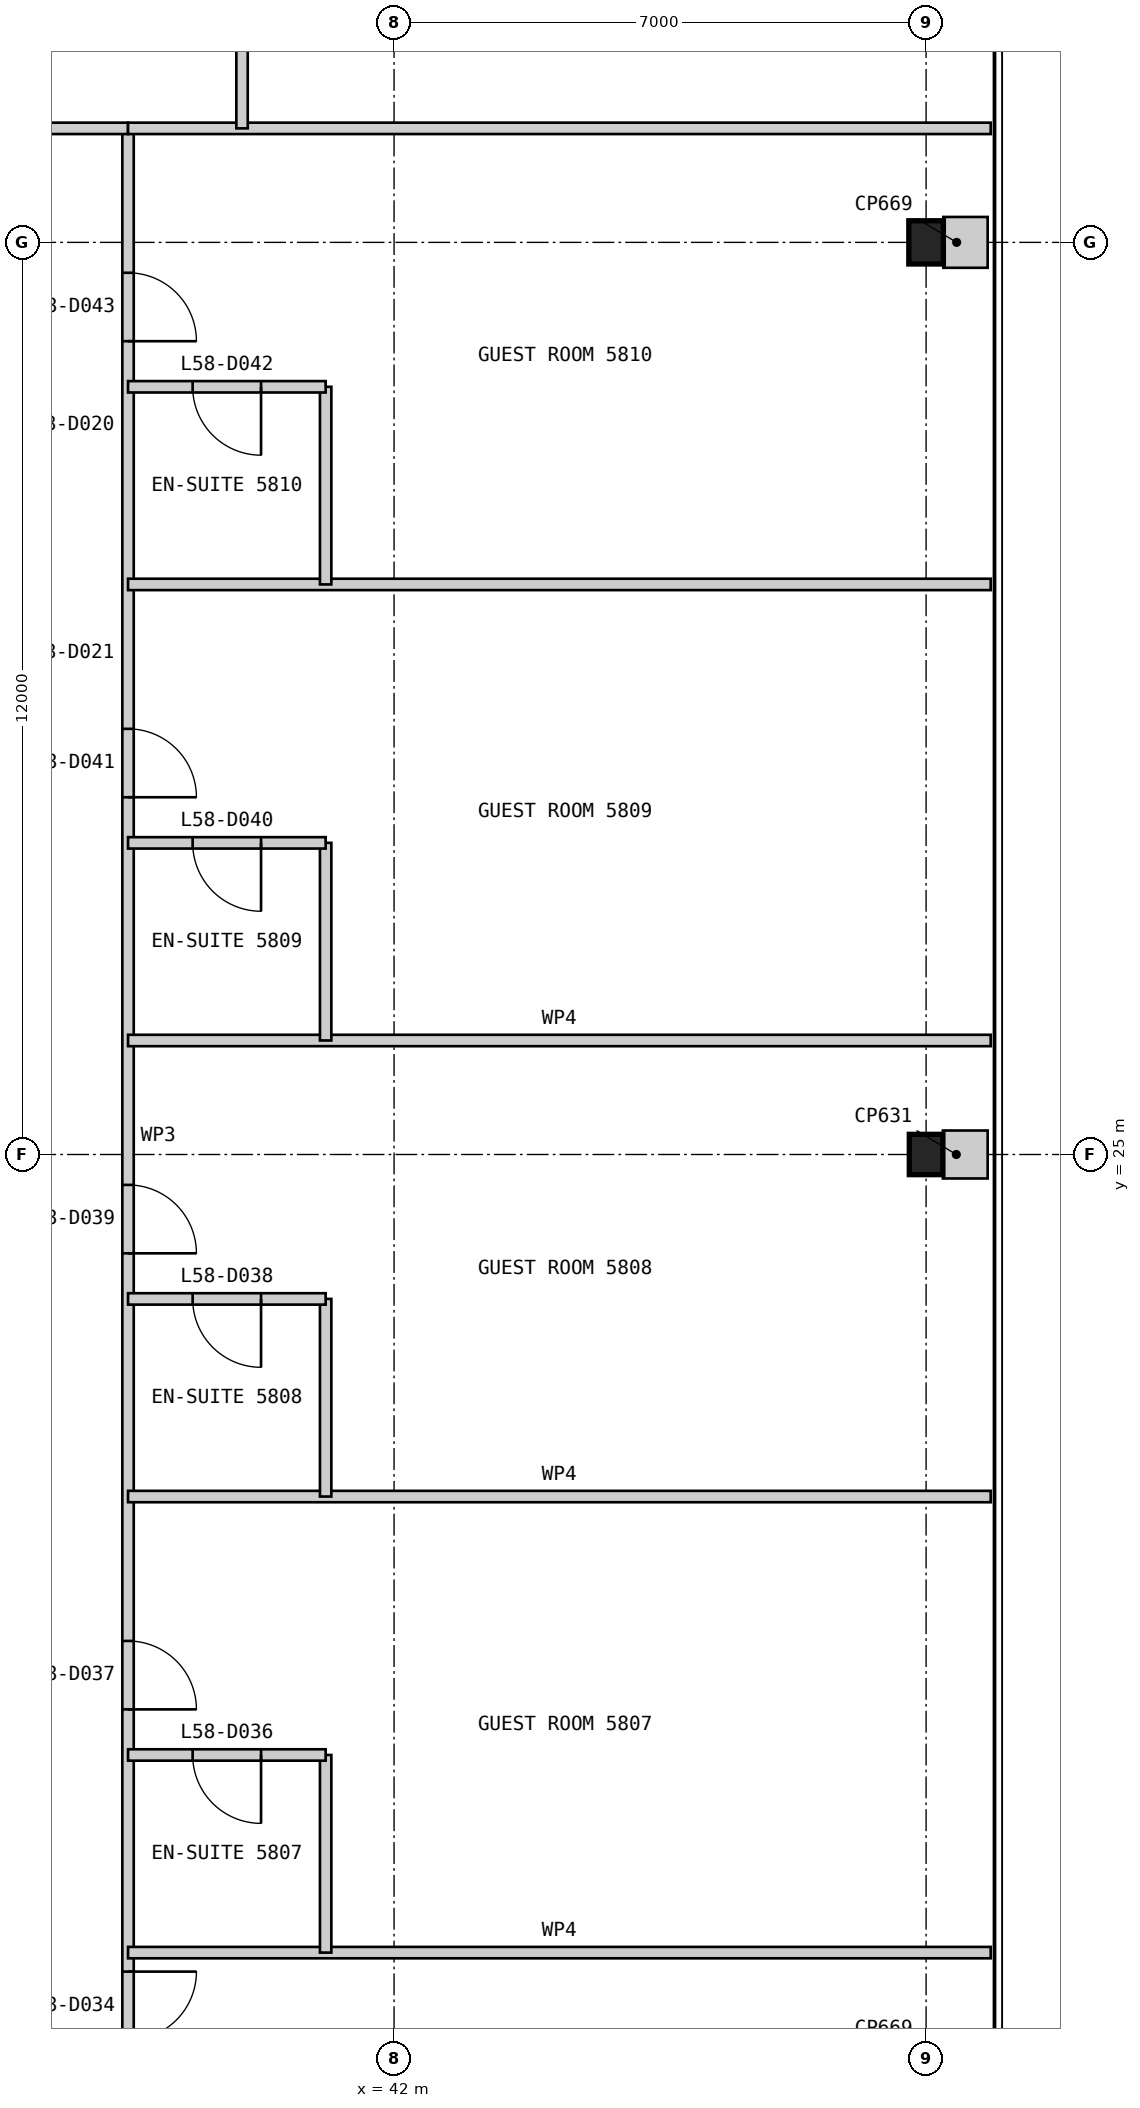
"""IFC4 building model, lengths in metres.
Left out: names, types, materials, properties, quantities, classifications, styles, units other than length and angle.
Written with IfcOpenShell. Run it as: python <this file> out.ifc"""

import sys

from ifc_helpers import new_model, si_unit, direction, frame, frame_2d, origin, origin_2d, place, context, subcontext, project, spatial, rectangle, i_section, extrude, element, fill, save


model = new_model("IFC4")
c1 = context("Model", 3, precision=1e-05, world=origin(), true_north=direction((0.0, 1.0)))
c2 = subcontext(c1, "Body", "Model", "MODEL_VIEW")
j1 = project(units=[si_unit("LENGTHUNIT", "METRE"), si_unit("PLANEANGLEUNIT", "RADIAN")], contexts=[c1])
p1 = place(None, origin())
s1 = spatial("IfcSite", under=j1, at=p1, CompositionType="ELEMENT")
p2 = place(p1, origin())
s2 = spatial("IfcBuilding", under=s1, at=p2, CompositionType="ELEMENT")
p3 = place(p2, frame((0.0, 0.0, 249.2)))
s3 = spatial("IfcBuildingStorey", under=s2, at=p3, CompositionType="ELEMENT", Elevation=249.2)
p4 = place(p3, frame((49.0, 25.0, 0.0), z_axis=(0.0, 0.0, 1.0), x_axis=(1.0, 0.0, 0.0)))
e1 = element("IfcColumn", 1, at=p4, inside=s3, PredefinedType="COLUMN", context=c2, shape_type="SweptSolid", body=[
    extrude(i_section(OverallWidth=0.442, OverallDepth=0.531, WebThickness=0.066, FlangeThickness=0.106, at=origin_2d()), origin(), (0.0, 0.0, 1.0), 3.4),
])
p5 = place(p3, frame((49.0, 37.0, 0.0), z_axis=(0.0, 0.0, 1.0), x_axis=(1.0, 0.0, 0.0)))
e2 = element("IfcColumn", 2, at=p5, inside=s3, PredefinedType="COLUMN", context=c2, shape_type="SweptSolid", body=[
    extrude(i_section(OverallWidth=0.455, OverallDepth=0.569, WebThickness=0.078, FlangeThickness=0.125, at=origin_2d()), origin(), (0.0, 0.0, 1.0), 3.4),
])
p6 = place(p3, frame((38.5, 11.5, 0.0), z_axis=(0.0, 0.0, 1.0), x_axis=(0.0, 1.0, 0.0)))
e3 = element("IfcWall", 3, at=p6, inside=s3, PredefinedType="PARTITIONING", context=c2, shape_type="SweptSolid", body=[
    extrude(rectangle(XDim=27.0, YDim=0.15, at=frame_2d((13.5, 0.0))), origin(), (0.0, 0.0, 1.0), 3.25),
])
p7 = place(p6, frame((1.85, 0.0, 0.0)))
e4 = element("IfcOpeningElement", 4, at=p7, cuts=e3, PredefinedType="OPENING", context=c2, shape_type="SweptSolid", body=[
    extrude(rectangle(XDim=0.9, YDim=2.1, at=frame_2d((0.45, 1.05))), frame((0.0, 0.085, 0.0), z_axis=(0.0, -1.0, 0.0), x_axis=(1.0, 0.0, 0.0)), (0.0, 0.0, 1.0), 0.17),
])
p8 = place(p6, frame((6.2, 0.0, 0.0)))
e5 = element("IfcOpeningElement", 5, at=p8, cuts=e3, PredefinedType="OPENING", context=c2, shape_type="SweptSolid", body=[
    extrude(rectangle(XDim=0.9, YDim=2.1, at=frame_2d((0.45, 1.05))), frame((0.0, 0.085, 0.0), z_axis=(0.0, -1.0, 0.0), x_axis=(1.0, 0.0, 0.0)), (0.0, 0.0, 1.0), 0.17),
])
p9 = place(p6, frame((12.2, 0.0, 0.0)))
e6 = element("IfcOpeningElement", 6, at=p9, cuts=e3, PredefinedType="OPENING", context=c2, shape_type="SweptSolid", body=[
    extrude(rectangle(XDim=0.9, YDim=2.1, at=frame_2d((0.45, 1.05))), frame((0.0, 0.085, 0.0), z_axis=(0.0, -1.0, 0.0), x_axis=(1.0, 0.0, 0.0)), (0.0, 0.0, 1.0), 0.17),
])
p10 = place(p6, frame((18.2, 0.0, 0.0)))
e7 = element("IfcOpeningElement", 7, at=p10, cuts=e3, PredefinedType="OPENING", context=c2, shape_type="SweptSolid", body=[
    extrude(rectangle(XDim=0.9, YDim=2.1, at=frame_2d((0.45, 1.05))), frame((0.0, 0.085, 0.0), z_axis=(0.0, -1.0, 0.0), x_axis=(1.0, 0.0, 0.0)), (0.0, 0.0, 1.0), 0.17),
])
p11 = place(p6, frame((24.2, 0.0, 0.0)))
e8 = element("IfcOpeningElement", 8, at=p11, cuts=e3, PredefinedType="OPENING", context=c2, shape_type="SweptSolid", body=[
    extrude(rectangle(XDim=0.9, YDim=2.1, at=frame_2d((0.45, 1.05))), frame((0.0, 0.085, 0.0), z_axis=(0.0, -1.0, 0.0), x_axis=(1.0, 0.0, 0.0)), (0.0, 0.0, 1.0), 0.17),
])
p12 = place(p3, frame((49.85, 14.5, 0.0), z_axis=(0.0, 0.0, 1.0), x_axis=(-1.0, 0.0, 0.0)))
e9 = element("IfcWall", 9, at=p12, inside=s3, PredefinedType="PARTITIONING", context=c2, shape_type="SweptSolid", body=[
    extrude(rectangle(XDim=11.35, YDim=0.15, at=frame_2d((5.675, 0.0))), origin(), (0.0, 0.0, 1.0), 3.25),
])
p13 = place(p3, frame((41.1, 14.5, 0.0), z_axis=(0.0, 0.0, 1.0), x_axis=(0.0, 1.0, 0.0)))
e10 = element("IfcWall", 10, at=p13, inside=s3, PredefinedType="PARTITIONING", context=c2, shape_type="SweptSolid", body=[
    extrude(rectangle(XDim=2.6, YDim=0.15, at=frame_2d((1.3, 0.0))), origin(), (0.0, 0.0, 1.0), 3.25),
])
p14 = place(p3, frame((41.1, 17.1, 0.0), z_axis=(0.0, 0.0, 1.0), x_axis=(-1.0, 0.0, 0.0)))
e11 = element("IfcWall", 11, at=p14, inside=s3, PredefinedType="PARTITIONING", context=c2, shape_type="SweptSolid", body=[
    extrude(rectangle(XDim=2.6, YDim=0.15, at=frame_2d((1.3, 0.0))), origin(), (0.0, 0.0, 1.0), 3.25),
])
p15 = place(p14, frame((0.85, 0.0, 0.0)))
e12 = element("IfcOpeningElement", 12, at=p15, cuts=e11, PredefinedType="OPENING", context=c2, shape_type="SweptSolid", body=[
    extrude(rectangle(XDim=0.9, YDim=2.1, at=frame_2d((0.45, 1.05))), frame((0.0, 0.085, 0.0), z_axis=(0.0, -1.0, 0.0), x_axis=(1.0, 0.0, 0.0)), (0.0, 0.0, 1.0), 0.17),
])
p16 = place(p3, frame((49.85, 20.5, 0.0), z_axis=(0.0, 0.0, 1.0), x_axis=(-1.0, 0.0, 0.0)))
e13 = element("IfcWall", 13, at=p16, inside=s3, PredefinedType="PARTITIONING", context=c2, shape_type="SweptSolid", body=[
    extrude(rectangle(XDim=11.35, YDim=0.15, at=frame_2d((5.675, 0.0))), origin(), (0.0, 0.0, 1.0), 3.25),
])
p17 = place(p3, frame((41.1, 20.5, 0.0), z_axis=(0.0, 0.0, 1.0), x_axis=(0.0, 1.0, 0.0)))
e14 = element("IfcWall", 14, at=p17, inside=s3, PredefinedType="PARTITIONING", context=c2, shape_type="SweptSolid", body=[
    extrude(rectangle(XDim=2.6, YDim=0.15, at=frame_2d((1.3, 0.0))), origin(), (0.0, 0.0, 1.0), 3.25),
])
p18 = place(p3, frame((41.1, 23.1, 0.0), z_axis=(0.0, 0.0, 1.0), x_axis=(-1.0, 0.0, 0.0)))
e15 = element("IfcWall", 15, at=p18, inside=s3, PredefinedType="PARTITIONING", context=c2, shape_type="SweptSolid", body=[
    extrude(rectangle(XDim=2.6, YDim=0.15, at=frame_2d((1.3, 0.0))), origin(), (0.0, 0.0, 1.0), 3.25),
])
p19 = place(p18, frame((0.85, 0.0, 0.0)))
e16 = element("IfcOpeningElement", 16, at=p19, cuts=e15, PredefinedType="OPENING", context=c2, shape_type="SweptSolid", body=[
    extrude(rectangle(XDim=0.9, YDim=2.1, at=frame_2d((0.45, 1.05))), frame((0.0, 0.085, 0.0), z_axis=(0.0, -1.0, 0.0), x_axis=(1.0, 0.0, 0.0)), (0.0, 0.0, 1.0), 0.17),
])
p20 = place(p3, frame((49.85, 26.5, 0.0), z_axis=(0.0, 0.0, 1.0), x_axis=(-1.0, 0.0, 0.0)))
e17 = element("IfcWall", 17, at=p20, inside=s3, PredefinedType="PARTITIONING", context=c2, shape_type="SweptSolid", body=[
    extrude(rectangle(XDim=11.35, YDim=0.15, at=frame_2d((5.675, 0.0))), origin(), (0.0, 0.0, 1.0), 3.25),
])
p21 = place(p3, frame((41.1, 26.5, 0.0), z_axis=(0.0, 0.0, 1.0), x_axis=(0.0, 1.0, 0.0)))
e18 = element("IfcWall", 18, at=p21, inside=s3, PredefinedType="PARTITIONING", context=c2, shape_type="SweptSolid", body=[
    extrude(rectangle(XDim=2.6, YDim=0.15, at=frame_2d((1.3, 0.0))), origin(), (0.0, 0.0, 1.0), 3.25),
])
p22 = place(p3, frame((41.1, 29.1, 0.0), z_axis=(0.0, 0.0, 1.0), x_axis=(-1.0, 0.0, 0.0)))
e19 = element("IfcWall", 19, at=p22, inside=s3, PredefinedType="PARTITIONING", context=c2, shape_type="SweptSolid", body=[
    extrude(rectangle(XDim=2.6, YDim=0.15, at=frame_2d((1.3, 0.0))), origin(), (0.0, 0.0, 1.0), 3.25),
])
p23 = place(p22, frame((0.85, 0.0, 0.0)))
e20 = element("IfcOpeningElement", 20, at=p23, cuts=e19, PredefinedType="OPENING", context=c2, shape_type="SweptSolid", body=[
    extrude(rectangle(XDim=0.9, YDim=2.1, at=frame_2d((0.45, 1.05))), frame((0.0, 0.085, 0.0), z_axis=(0.0, -1.0, 0.0), x_axis=(1.0, 0.0, 0.0)), (0.0, 0.0, 1.0), 0.17),
])
p24 = place(p3, frame((49.85, 32.5, 0.0), z_axis=(0.0, 0.0, 1.0), x_axis=(-1.0, 0.0, 0.0)))
e21 = element("IfcWall", 21, at=p24, inside=s3, PredefinedType="PARTITIONING", context=c2, shape_type="SweptSolid", body=[
    extrude(rectangle(XDim=11.35, YDim=0.15, at=frame_2d((5.675, 0.0))), origin(), (0.0, 0.0, 1.0), 3.25),
])
p25 = place(p3, frame((41.1, 32.5, 0.0), z_axis=(0.0, 0.0, 1.0), x_axis=(0.0, 1.0, 0.0)))
e22 = element("IfcWall", 22, at=p25, inside=s3, PredefinedType="PARTITIONING", context=c2, shape_type="SweptSolid", body=[
    extrude(rectangle(XDim=2.6, YDim=0.15, at=frame_2d((1.3, 0.0))), origin(), (0.0, 0.0, 1.0), 3.25),
])
p26 = place(p3, frame((41.1, 35.1, 0.0), z_axis=(0.0, 0.0, 1.0), x_axis=(-1.0, 0.0, 0.0)))
e23 = element("IfcWall", 23, at=p26, inside=s3, PredefinedType="PARTITIONING", context=c2, shape_type="SweptSolid", body=[
    extrude(rectangle(XDim=2.6, YDim=0.15, at=frame_2d((1.3, 0.0))), origin(), (0.0, 0.0, 1.0), 3.25),
])
p27 = place(p26, frame((0.85, 0.0, 0.0)))
e24 = element("IfcOpeningElement", 24, at=p27, cuts=e23, PredefinedType="OPENING", context=c2, shape_type="SweptSolid", body=[
    extrude(rectangle(XDim=0.9, YDim=2.1, at=frame_2d((0.45, 1.05))), frame((0.0, 0.085, 0.0), z_axis=(0.0, -1.0, 0.0), x_axis=(1.0, 0.0, 0.0)), (0.0, 0.0, 1.0), 0.17),
])
p28 = place(p3, frame((38.5, 38.5, 0.0), z_axis=(0.0, 0.0, 1.0), x_axis=(-1.0, 0.0, 0.0)))
e25 = element("IfcWall", 25, at=p28, inside=s3, PredefinedType="PARTITIONING", context=c2, shape_type="SweptSolid", body=[
    extrude(rectangle(XDim=27.0, YDim=0.15, at=frame_2d((13.5, 0.0))), origin(), (0.0, 0.0, 1.0), 3.25),
])
p29 = place(p28, frame((1.85, 0.0, 0.0)))
e26 = element("IfcOpeningElement", 26, at=p29, cuts=e25, PredefinedType="OPENING", context=c2, shape_type="SweptSolid", body=[
    extrude(rectangle(XDim=0.9, YDim=2.1, at=frame_2d((0.45, 1.05))), frame((0.0, 0.085, 0.0), z_axis=(0.0, -1.0, 0.0), x_axis=(1.0, 0.0, 0.0)), (0.0, 0.0, 1.0), 0.17),
])
p30 = place(p28, frame((6.2, 0.0, 0.0)))
e27 = element("IfcOpeningElement", 27, at=p30, cuts=e25, PredefinedType="OPENING", context=c2, shape_type="SweptSolid", body=[
    extrude(rectangle(XDim=0.9, YDim=2.1, at=frame_2d((0.45, 1.05))), frame((0.0, 0.085, 0.0), z_axis=(0.0, -1.0, 0.0), x_axis=(1.0, 0.0, 0.0)), (0.0, 0.0, 1.0), 0.17),
])
p31 = place(p28, frame((12.8, 0.0, 0.0)))
e28 = element("IfcOpeningElement", 28, at=p31, cuts=e25, PredefinedType="OPENING", context=c2, shape_type="SweptSolid", body=[
    extrude(rectangle(XDim=1.0, YDim=2.1, at=frame_2d((0.5, 1.05))), frame((0.0, 0.085, 0.0), z_axis=(0.0, -1.0, 0.0), x_axis=(1.0, 0.0, 0.0)), (0.0, 0.0, 1.0), 0.17),
])
p32 = place(p28, frame((18.2, 0.0, 0.0)))
e29 = element("IfcOpeningElement", 29, at=p32, cuts=e25, PredefinedType="OPENING", context=c2, shape_type="SweptSolid", body=[
    extrude(rectangle(XDim=0.9, YDim=2.1, at=frame_2d((0.45, 1.05))), frame((0.0, 0.085, 0.0), z_axis=(0.0, -1.0, 0.0), x_axis=(1.0, 0.0, 0.0)), (0.0, 0.0, 1.0), 0.17),
])
p33 = place(p28, frame((24.2, 0.0, 0.0)))
e30 = element("IfcOpeningElement", 30, at=p33, cuts=e25, PredefinedType="OPENING", context=c2, shape_type="SweptSolid", body=[
    extrude(rectangle(XDim=0.9, YDim=2.1, at=frame_2d((0.45, 1.05))), frame((0.0, 0.085, 0.0), z_axis=(0.0, -1.0, 0.0), x_axis=(1.0, 0.0, 0.0)), (0.0, 0.0, 1.0), 0.17),
])
p34 = place(p3, frame((49.85, 38.5, 0.0), z_axis=(0.0, 0.0, 1.0), x_axis=(-1.0, 0.0, 0.0)))
e31 = element("IfcWall", 31, at=p34, inside=s3, PredefinedType="PARTITIONING", context=c2, shape_type="SweptSolid", body=[
    extrude(rectangle(XDim=11.35, YDim=0.15, at=frame_2d((5.675, 0.0))), origin(), (0.0, 0.0, 1.0), 3.25),
])
p35 = place(p3, frame((40.0, 41.1, 0.0), z_axis=(0.0, 0.0, 1.0), x_axis=(0.0, -1.0, 0.0)))
e32 = element("IfcWall", 32, at=p35, inside=s3, PredefinedType="PARTITIONING", context=c2, shape_type="SweptSolid", body=[
    extrude(rectangle(XDim=2.6, YDim=0.15, at=frame_2d((1.3, 0.0))), origin(), (0.0, 0.0, 1.0), 3.25),
])
p36 = place(p3, frame((49.81, 25.0, 0.0), z_axis=(0.0, 0.0, 1.0), x_axis=(-1.0, 0.0, 0.0)))
e33 = element("IfcWall", 33, at=p36, inside=s3, PredefinedType="PARTITIONING", context=c2, shape_type="SweptSolid", body=[
    extrude(rectangle(XDim=0.589, YDim=0.631, at=frame_2d((0.294, 0.0))), origin(), (0.0, 0.0, 1.0), 3.25),
])
p37 = place(p3, frame((49.81, 37.0, 0.0), z_axis=(0.0, 0.0, 1.0), x_axis=(-1.0, 0.0, 0.0)))
e34 = element("IfcWall", 34, at=p37, inside=s3, PredefinedType="PARTITIONING", context=c2, shape_type="SweptSolid", body=[
    extrude(rectangle(XDim=0.583, YDim=0.669, at=frame_2d((0.292, 0.0))), origin(), (0.0, 0.0, 1.0), 3.25),
])
p38 = place(p7, frame((0.9, 0.0, 0.0), z_axis=(0.0, 0.0, 1.0), x_axis=(-1.0, 0.0, 0.0)))
e35 = element("IfcDoor", 35, at=p38, inside=s3, OperationType="SINGLE_SWING_LEFT", PredefinedType="DOOR", context=c2, shape_type="SweptSolid", body=[
    extrude(rectangle(XDim=0.9, YDim=2.1, at=frame_2d((0.45, 1.05))), frame((0.0, 0.025, 0.0), z_axis=(0.0, -1.0, 0.0), x_axis=(1.0, 0.0, 0.0)), (0.0, 0.0, 1.0), 0.05),
])
fill(e4, e35)
p39 = place(p15, origin())
e36 = element("IfcDoor", 36, at=p39, inside=s3, OperationType="SINGLE_SWING_LEFT", PredefinedType="DOOR", context=c2, shape_type="SweptSolid", body=[
    extrude(rectangle(XDim=0.9, YDim=2.1, at=frame_2d((0.45, 1.05))), frame((0.0, 0.025, 0.0), z_axis=(0.0, -1.0, 0.0), x_axis=(1.0, 0.0, 0.0)), (0.0, 0.0, 1.0), 0.05),
])
fill(e12, e36)
p40 = place(p8, frame((0.9, 0.0, 0.0), z_axis=(0.0, 0.0, 1.0), x_axis=(-1.0, 0.0, 0.0)))
e37 = element("IfcDoor", 37, at=p40, inside=s3, OperationType="SINGLE_SWING_RIGHT", PredefinedType="DOOR", context=c2, shape_type="SweptSolid", body=[
    extrude(rectangle(XDim=0.9, YDim=2.1, at=frame_2d((0.45, 1.05))), frame((0.0, 0.025, 0.0), z_axis=(0.0, -1.0, 0.0), x_axis=(1.0, 0.0, 0.0)), (0.0, 0.0, 1.0), 0.05),
])
fill(e5, e37)
p41 = place(p19, origin())
e38 = element("IfcDoor", 38, at=p41, inside=s3, OperationType="SINGLE_SWING_LEFT", PredefinedType="DOOR", context=c2, shape_type="SweptSolid", body=[
    extrude(rectangle(XDim=0.9, YDim=2.1, at=frame_2d((0.45, 1.05))), frame((0.0, 0.025, 0.0), z_axis=(0.0, -1.0, 0.0), x_axis=(1.0, 0.0, 0.0)), (0.0, 0.0, 1.0), 0.05),
])
fill(e16, e38)
p42 = place(p9, frame((0.9, 0.0, 0.0), z_axis=(0.0, 0.0, 1.0), x_axis=(-1.0, 0.0, 0.0)))
e39 = element("IfcDoor", 39, at=p42, inside=s3, OperationType="SINGLE_SWING_RIGHT", PredefinedType="DOOR", context=c2, shape_type="SweptSolid", body=[
    extrude(rectangle(XDim=0.9, YDim=2.1, at=frame_2d((0.45, 1.05))), frame((0.0, 0.025, 0.0), z_axis=(0.0, -1.0, 0.0), x_axis=(1.0, 0.0, 0.0)), (0.0, 0.0, 1.0), 0.05),
])
fill(e6, e39)
p43 = place(p23, origin())
e40 = element("IfcDoor", 40, at=p43, inside=s3, OperationType="SINGLE_SWING_LEFT", PredefinedType="DOOR", context=c2, shape_type="SweptSolid", body=[
    extrude(rectangle(XDim=0.9, YDim=2.1, at=frame_2d((0.45, 1.05))), frame((0.0, 0.025, 0.0), z_axis=(0.0, -1.0, 0.0), x_axis=(1.0, 0.0, 0.0)), (0.0, 0.0, 1.0), 0.05),
])
fill(e20, e40)
p44 = place(p10, frame((0.9, 0.0, 0.0), z_axis=(0.0, 0.0, 1.0), x_axis=(-1.0, 0.0, 0.0)))
e41 = element("IfcDoor", 41, at=p44, inside=s3, OperationType="SINGLE_SWING_RIGHT", PredefinedType="DOOR", context=c2, shape_type="SweptSolid", body=[
    extrude(rectangle(XDim=0.9, YDim=2.1, at=frame_2d((0.45, 1.05))), frame((0.0, 0.025, 0.0), z_axis=(0.0, -1.0, 0.0), x_axis=(1.0, 0.0, 0.0)), (0.0, 0.0, 1.0), 0.05),
])
fill(e7, e41)
p45 = place(p27, origin())
e42 = element("IfcDoor", 42, at=p45, inside=s3, OperationType="SINGLE_SWING_LEFT", PredefinedType="DOOR", context=c2, shape_type="SweptSolid", body=[
    extrude(rectangle(XDim=0.9, YDim=2.1, at=frame_2d((0.45, 1.05))), frame((0.0, 0.025, 0.0), z_axis=(0.0, -1.0, 0.0), x_axis=(1.0, 0.0, 0.0)), (0.0, 0.0, 1.0), 0.05),
])
fill(e24, e42)
p46 = place(p11, frame((0.9, 0.0, 0.0), z_axis=(0.0, 0.0, 1.0), x_axis=(-1.0, 0.0, 0.0)))
e43 = element("IfcDoor", 43, at=p46, inside=s3, OperationType="SINGLE_SWING_RIGHT", PredefinedType="DOOR", context=c2, shape_type="SweptSolid", body=[
    extrude(rectangle(XDim=0.9, YDim=2.1, at=frame_2d((0.45, 1.05))), frame((0.0, 0.025, 0.0), z_axis=(0.0, -1.0, 0.0), x_axis=(1.0, 0.0, 0.0)), (0.0, 0.0, 1.0), 0.05),
])
fill(e8, e43)
save(model, sys.argv[1])
